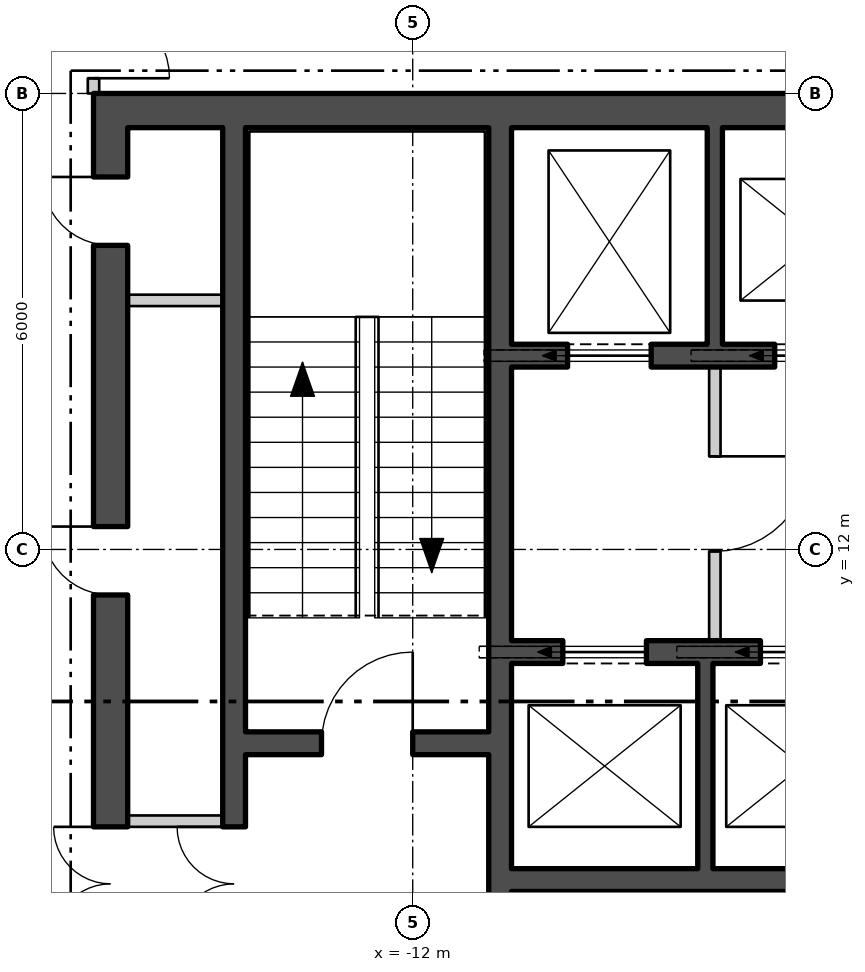
"""IFC4 building model, lengths in metres.
Left out: names, types, materials, properties, quantities, classifications, styles, units other than length and angle.
Written with IfcOpenShell. Run it as: python <this file> out.ifc"""

import sys

from ifc_helpers import new_model, si_unit, direction, frame, frame_2d, origin, place, context, subcontext, project, spatial, polyline, rectangle, outline, extrude, element, fill, save


model = new_model("IFC4")
c1 = context("Model", 3, precision=1e-05, world=origin(), true_north=direction((0.0, 1.0)))
c2 = subcontext(c1, "Body", "Model", "MODEL_VIEW")
j1 = project(units=[si_unit("LENGTHUNIT", "METRE"), si_unit("PLANEANGLEUNIT", "RADIAN")], contexts=[c1])
p1 = place(None, origin())
s1 = spatial("IfcSite", under=j1, at=p1, CompositionType="ELEMENT")
p2 = place(p1, origin())
s2 = spatial("IfcBuilding", under=s1, at=p2, CompositionType="ELEMENT")
p3 = place(p2, frame((0.0, 0.0, 227.7)))
s3 = spatial("IfcBuildingStorey", under=s2, at=p3, CompositionType="ELEMENT", Elevation=227.7)
p4 = place(p3, frame((-26.075, 14.415, -0.18), z_axis=(0.0, 0.0, 1.0), x_axis=(0.499999194392, -0.866025868902, 0.0)))
e1 = element("IfcWall", 1, at=p4, inside=s3, PredefinedType="SOLIDWALL", context=c2, shape_type="SweptSolid", body=[
    extrude(outline(polyline([(-0.13, -0.225), (45.86, -0.225), (45.6, 0.225), (0.13, 0.225), (-0.13, -0.225)])), origin(), (0.0, 0.0, 1.0), 3.68),
])
p5 = place(p4, frame((1.424, 0.0, 1.08)))
e2 = element("IfcOpeningElement", 2, at=p5, cuts=e1, PredefinedType="OPENING", context=c2, shape_type="SweptSolid", body=[
    extrude(rectangle(XDim=2.4, YDim=2.0, at=frame_2d((1.2, 1.0))), frame((0.0, 0.235, 0.0), z_axis=(0.0, -1.0, 0.0), x_axis=(1.0, 0.0, 0.0)), (0.0, 0.0, 1.0), 0.47),
])
p6 = place(p4, frame((5.892, 0.0, 1.08)))
e3 = element("IfcOpeningElement", 3, at=p6, cuts=e1, PredefinedType="OPENING", context=c2, shape_type="SweptSolid", body=[
    extrude(rectangle(XDim=2.4, YDim=2.0, at=frame_2d((1.2, 1.0))), frame((0.0, 0.235, 0.0), z_axis=(0.0, -1.0, 0.0), x_axis=(1.0, 0.0, 0.0)), (0.0, 0.0, 1.0), 0.47),
])
p7 = place(p4, frame((10.399, 0.0, 1.08)))
e4 = element("IfcOpeningElement", 4, at=p7, cuts=e1, PredefinedType="OPENING", context=c2, shape_type="SweptSolid", body=[
    extrude(rectangle(XDim=2.4, YDim=2.0, at=frame_2d((1.2, 1.0))), frame((0.0, 0.235, 0.0), z_axis=(0.0, -1.0, 0.0), x_axis=(1.0, 0.0, 0.0)), (0.0, 0.0, 1.0), 0.47),
])
p8 = place(p4, frame((19.412, 0.0, 1.08)))
e5 = element("IfcOpeningElement", 5, at=p8, cuts=e1, PredefinedType="OPENING", context=c2, shape_type="SweptSolid", body=[
    extrude(rectangle(XDim=2.4, YDim=2.0, at=frame_2d((1.2, 1.0))), frame((0.0, 0.235, 0.0), z_axis=(0.0, -1.0, 0.0), x_axis=(1.0, 0.0, 0.0)), (0.0, 0.0, 1.0), 0.47),
])
p9 = place(p4, frame((23.918, 0.0, 1.08)))
e6 = element("IfcOpeningElement", 6, at=p9, cuts=e1, PredefinedType="OPENING", context=c2, shape_type="SweptSolid", body=[
    extrude(rectangle(XDim=2.4, YDim=2.0, at=frame_2d((1.2, 1.0))), frame((0.0, 0.235, 0.0), z_axis=(0.0, -1.0, 0.0), x_axis=(1.0, 0.0, 0.0)), (0.0, 0.0, 1.0), 0.47),
])
p10 = place(p4, frame((28.425, 0.0, 1.08)))
e7 = element("IfcOpeningElement", 7, at=p10, cuts=e1, PredefinedType="OPENING", context=c2, shape_type="SweptSolid", body=[
    extrude(rectangle(XDim=2.4, YDim=2.0, at=frame_2d((1.2, 1.0))), frame((0.0, 0.235, 0.0), z_axis=(0.0, -1.0, 0.0), x_axis=(1.0, 0.0, 0.0)), (0.0, 0.0, 1.0), 0.47),
])
p11 = place(p4, frame((32.932, 0.0, 1.08)))
e8 = element("IfcOpeningElement", 8, at=p11, cuts=e1, PredefinedType="OPENING", context=c2, shape_type="SweptSolid", body=[
    extrude(rectangle(XDim=2.4, YDim=2.0, at=frame_2d((1.2, 1.0))), frame((0.0, 0.235, 0.0), z_axis=(0.0, -1.0, 0.0), x_axis=(1.0, 0.0, 0.0)), (0.0, 0.0, 1.0), 0.47),
])
p12 = place(p4, frame((41.907, 0.0, 1.08)))
e9 = element("IfcOpeningElement", 9, at=p12, cuts=e1, PredefinedType="OPENING", context=c2, shape_type="SweptSolid", body=[
    extrude(rectangle(XDim=2.4, YDim=2.0, at=frame_2d((1.2, 1.0))), frame((0.0, 0.235, 0.0), z_axis=(0.0, -1.0, 0.0), x_axis=(1.0, 0.0, 0.0)), (0.0, 0.0, 1.0), 0.47),
])
p13 = place(p3, frame((-16.2, 17.775, 0.0), z_axis=(0.0, 0.0, 1.0), x_axis=(1.0, 0.0, 0.0)))
e10 = element("IfcWall", 10, at=p13, inside=s3, PredefinedType="SHEAR", context=c2, shape_type="SweptSolid", body=[
    extrude(rectangle(XDim=32.4, YDim=0.45, at=frame_2d((16.2, 0.0))), origin(), (0.0, 0.0, 1.0), 3.7),
])
p14 = place(p3, frame((-15.975, 2.45, 0.0), z_axis=(0.0, 0.0, 1.0), x_axis=(0.0, 1.0, 0.0)))
e11 = element("IfcWall", 11, at=p14, inside=s3, PredefinedType="SHEAR", context=c2, shape_type="SweptSolid", body=[
    extrude(rectangle(XDim=15.1, YDim=0.45, at=frame_2d((7.55, 0.0))), origin(), (0.0, 0.0, 1.0), 3.7),
])
p15 = place(p14, frame((4.4, 0.0, 0.0)))
e12 = element("IfcOpeningElement", 12, at=p15, cuts=e11, PredefinedType="OPENING", context=c2, shape_type="SweptSolid", body=[
    extrude(rectangle(XDim=1.5, YDim=2.1, at=frame_2d((0.75, 1.05))), frame((0.0, 0.235, 0.0), z_axis=(0.0, -1.0, 0.0), x_axis=(1.0, 0.0, 0.0)), (0.0, 0.0, 1.0), 0.47),
])
p16 = place(p14, frame((0.85, 0.0, 0.0)))
e13 = element("IfcOpeningElement", 13, at=p16, cuts=e11, PredefinedType="OPENING", context=c2, shape_type="SweptSolid", body=[
    extrude(rectangle(XDim=0.9, YDim=2.1, at=frame_2d((0.45, 1.05))), frame((0.0, 0.235, 0.0), z_axis=(0.0, -1.0, 0.0), x_axis=(1.0, 0.0, 0.0)), (0.0, 0.0, 1.0), 0.47),
])
p17 = place(p14, frame((3.0, 0.0, 0.0)))
e14 = element("IfcOpeningElement", 14, at=p17, cuts=e11, PredefinedType="OPENING", context=c2, shape_type="SweptSolid", body=[
    extrude(rectangle(XDim=1.0, YDim=2.1, at=frame_2d((0.5, 1.05))), frame((0.0, 0.235, 0.0), z_axis=(0.0, -1.0, 0.0), x_axis=(1.0, 0.0, 0.0)), (0.0, 0.0, 1.0), 0.47),
])
p18 = place(p14, frame((8.951, 0.0, 0.0)))
e15 = element("IfcOpeningElement", 15, at=p18, cuts=e11, PredefinedType="OPENING", context=c2, shape_type="SweptSolid", body=[
    extrude(rectangle(XDim=0.9, YDim=2.1, at=frame_2d((0.45, 1.05))), frame((0.0, 0.235, 0.0), z_axis=(0.0, -1.0, 0.0), x_axis=(1.0, 0.0, 0.0)), (0.0, 0.0, 1.0), 0.47),
])
p19 = place(p14, frame((13.551, 0.0, 0.0)))
e16 = element("IfcOpeningElement", 16, at=p19, cuts=e11, PredefinedType="OPENING", context=c2, shape_type="SweptSolid", body=[
    extrude(rectangle(XDim=0.9, YDim=2.1, at=frame_2d((0.45, 1.05))), frame((0.0, 0.235, 0.0), z_axis=(0.0, -1.0, 0.0), x_axis=(1.0, 0.0, 0.0)), (0.0, 0.0, 1.0), 0.47),
])
p20 = place(p3, frame((-10.85, 2.45, 0.0), z_axis=(0.0, 0.0, 1.0), x_axis=(0.0, 1.0, 0.0)))
e17 = element("IfcWall", 17, at=p20, inside=s3, PredefinedType="SHEAR", context=c2, shape_type="SweptSolid", body=[
    extrude(rectangle(XDim=15.1, YDim=0.3, at=frame_2d((7.55, 0.0))), origin(), (0.0, 0.0, 1.0), 3.7),
])
p21 = place(p20, frame((3.525, 0.0, 0.0)))
e18 = element("IfcOpeningElement", 18, at=p21, cuts=e17, PredefinedType="OPENING", context=c2, shape_type="SweptSolid", body=[
    extrude(rectangle(XDim=1.25, YDim=2.1, at=frame_2d((0.625, 1.05))), frame((0.0, 0.16, 0.0), z_axis=(0.0, -1.0, 0.0), x_axis=(1.0, 0.0, 0.0)), (0.0, 0.0, 1.0), 0.32),
])
p22 = place(p20, frame((1.15, 0.0, 0.0)))
e19 = element("IfcOpeningElement", 19, at=p22, cuts=e17, PredefinedType="OPENING", context=c2, shape_type="SweptSolid", body=[
    extrude(rectangle(XDim=1.0, YDim=2.1, at=frame_2d((0.5, 1.05))), frame((0.0, 0.16, 0.0), z_axis=(0.0, -1.0, 0.0), x_axis=(1.0, 0.0, 0.0)), (0.0, 0.0, 1.0), 0.32),
])
p23 = place(p3, frame((-14.35, 2.45, 0.0), z_axis=(0.0, 0.0, 1.0), x_axis=(0.0, 1.0, 0.0)))
e20 = element("IfcWall", 20, at=p23, inside=s3, PredefinedType="SHEAR", context=c2, shape_type="SweptSolid", body=[
    extrude(rectangle(XDim=15.1, YDim=0.3, at=frame_2d((7.55, 0.0))), origin(), (0.0, 0.0, 1.0), 3.7),
])
p24 = place(p23, frame((4.4, 0.0, 0.0)))
e21 = element("IfcOpeningElement", 21, at=p24, cuts=e20, PredefinedType="OPENING", context=c2, shape_type="SweptSolid", body=[
    extrude(rectangle(XDim=1.5, YDim=2.1, at=frame_2d((0.75, 1.05))), frame((0.0, 0.16, 0.0), z_axis=(0.0, -1.0, 0.0), x_axis=(1.0, 0.0, 0.0)), (0.0, 0.0, 1.0), 0.32),
])
p25 = place(p3, frame((-14.2, 9.45, 0.0), z_axis=(0.0, 0.0, 1.0), x_axis=(1.0, 0.0, 0.0)))
e22 = element("IfcWall", 22, at=p25, inside=s3, PredefinedType="SHEAR", context=c2, shape_type="SweptSolid", body=[
    extrude(rectangle(XDim=3.2, YDim=0.3, at=frame_2d((1.6, 0.0))), origin(), (0.0, 0.0, 1.0), 3.7),
])
p26 = place(p25, frame((1.0, 0.0, 0.0)))
e23 = element("IfcOpeningElement", 23, at=p26, cuts=e22, PredefinedType="OPENING", context=c2, shape_type="SweptSolid", body=[
    extrude(rectangle(XDim=1.2, YDim=2.1, at=frame_2d((0.6, 1.05))), frame((0.0, 0.16, 0.0), z_axis=(0.0, -1.0, 0.0), x_axis=(1.0, 0.0, 0.0)), (0.0, 0.0, 1.0), 0.32),
])
p27 = place(p3, frame((-10.7, 14.55, 0.0), z_axis=(0.0, 0.0, 1.0), x_axis=(1.0, 0.0, 0.0)))
e24 = element("IfcWall", 24, at=p27, inside=s3, PredefinedType="SHEAR", context=c2, shape_type="SweptSolid", body=[
    extrude(rectangle(XDim=21.4, YDim=0.3, at=frame_2d((10.7, 0.0))), origin(), (0.0, 0.0, 1.0), 3.7),
])
p28 = place(p27, frame((0.738, 0.0, 0.0)))
e25 = element("IfcOpeningElement", 25, at=p28, cuts=e24, PredefinedType="OPENING", context=c2, shape_type="SweptSolid", body=[
    extrude(rectangle(XDim=1.1, YDim=2.1, at=frame_2d((0.55, 1.05))), frame((0.0, 0.16, 0.0), z_axis=(0.0, -1.0, 0.0), x_axis=(1.0, 0.0, 0.0)), (0.0, 0.0, 1.0), 0.32),
])
p29 = place(p27, frame((3.462, 0.0, 0.0)))
e26 = element("IfcOpeningElement", 26, at=p29, cuts=e24, PredefinedType="OPENING", context=c2, shape_type="SweptSolid", body=[
    extrude(rectangle(XDim=1.1, YDim=2.1, at=frame_2d((0.55, 1.05))), frame((0.0, 0.16, 0.0), z_axis=(0.0, -1.0, 0.0), x_axis=(1.0, 0.0, 0.0)), (0.0, 0.0, 1.0), 0.32),
])
p30 = place(p27, frame((6.138, 0.0, 0.0)))
e27 = element("IfcOpeningElement", 27, at=p30, cuts=e24, PredefinedType="OPENING", context=c2, shape_type="SweptSolid", body=[
    extrude(rectangle(XDim=1.1, YDim=2.1, at=frame_2d((0.55, 1.05))), frame((0.0, 0.16, 0.0), z_axis=(0.0, -1.0, 0.0), x_axis=(1.0, 0.0, 0.0)), (0.0, 0.0, 1.0), 0.32),
])
p31 = place(p27, frame((8.812, 0.0, 0.0)))
e28 = element("IfcOpeningElement", 28, at=p31, cuts=e24, PredefinedType="OPENING", context=c2, shape_type="SweptSolid", body=[
    extrude(rectangle(XDim=1.1, YDim=2.1, at=frame_2d((0.55, 1.05))), frame((0.0, 0.16, 0.0), z_axis=(0.0, -1.0, 0.0), x_axis=(1.0, 0.0, 0.0)), (0.0, 0.0, 1.0), 0.32),
])
p32 = place(p27, frame((19.562, 0.0, 0.0)))
e29 = element("IfcOpeningElement", 29, at=p32, cuts=e24, PredefinedType="OPENING", context=c2, shape_type="SweptSolid", body=[
    extrude(rectangle(XDim=1.1, YDim=2.1, at=frame_2d((0.55, 1.05))), frame((0.0, 0.16, 0.0), z_axis=(0.0, -1.0, 0.0), x_axis=(1.0, 0.0, 0.0)), (0.0, 0.0, 1.0), 0.32),
])
p33 = place(p27, frame((11.537, 0.0, 0.0)))
e30 = element("IfcOpeningElement", 30, at=p33, cuts=e24, PredefinedType="OPENING", context=c2, shape_type="SweptSolid", body=[
    extrude(rectangle(XDim=1.0, YDim=2.1, at=frame_2d((0.5, 1.05))), frame((0.0, 0.16, 0.0), z_axis=(0.0, -1.0, 0.0), x_axis=(1.0, 0.0, 0.0)), (0.0, 0.0, 1.0), 0.32),
])
p34 = place(p27, frame((14.213, 0.0, 0.0)))
e31 = element("IfcOpeningElement", 31, at=p34, cuts=e24, PredefinedType="OPENING", context=c2, shape_type="SweptSolid", body=[
    extrude(rectangle(XDim=1.0, YDim=2.1, at=frame_2d((0.5, 1.05))), frame((0.0, 0.16, 0.0), z_axis=(0.0, -1.0, 0.0), x_axis=(1.0, 0.0, 0.0)), (0.0, 0.0, 1.0), 0.32),
])
p35 = place(p27, frame((16.887, 0.0, 0.0)))
e32 = element("IfcOpeningElement", 32, at=p35, cuts=e24, PredefinedType="OPENING", context=c2, shape_type="SweptSolid", body=[
    extrude(rectangle(XDim=1.0, YDim=2.1, at=frame_2d((0.5, 1.05))), frame((0.0, 0.16, 0.0), z_axis=(0.0, -1.0, 0.0), x_axis=(1.0, 0.0, 0.0)), (0.0, 0.0, 1.0), 0.32),
])
p36 = place(p3, frame((-10.7, 10.65, 0.0), z_axis=(0.0, 0.0, 1.0), x_axis=(1.0, 0.0, 0.0)))
e33 = element("IfcWall", 33, at=p36, inside=s3, PredefinedType="SHEAR", context=c2, shape_type="SweptSolid", body=[
    extrude(rectangle(XDim=10.3, YDim=0.3, at=frame_2d((5.15, 0.0))), origin(), (0.0, 0.0, 1.0), 3.7),
])
p37 = place(p36, frame((0.675, 0.0, 0.0)))
e34 = element("IfcOpeningElement", 34, at=p37, cuts=e33, PredefinedType="OPENING", context=c2, shape_type="SweptSolid", body=[
    extrude(rectangle(XDim=1.1, YDim=2.1, at=frame_2d((0.55, 1.05))), frame((0.0, 0.16, 0.0), z_axis=(0.0, -1.0, 0.0), x_axis=(1.0, 0.0, 0.0)), (0.0, 0.0, 1.0), 0.32),
])
p38 = place(p36, frame((3.275, 0.0, 0.0)))
e35 = element("IfcOpeningElement", 35, at=p38, cuts=e33, PredefinedType="OPENING", context=c2, shape_type="SweptSolid", body=[
    extrude(rectangle(XDim=1.1, YDim=2.1, at=frame_2d((0.55, 1.05))), frame((0.0, 0.16, 0.0), z_axis=(0.0, -1.0, 0.0), x_axis=(1.0, 0.0, 0.0)), (0.0, 0.0, 1.0), 0.32),
])
p39 = place(p36, frame((5.825, 0.0, 0.0)))
e36 = element("IfcOpeningElement", 36, at=p39, cuts=e33, PredefinedType="OPENING", context=c2, shape_type="SweptSolid", body=[
    extrude(rectangle(XDim=1.1, YDim=2.1, at=frame_2d((0.55, 1.05))), frame((0.0, 0.16, 0.0), z_axis=(0.0, -1.0, 0.0), x_axis=(1.0, 0.0, 0.0)), (0.0, 0.0, 1.0), 0.32),
])
p40 = place(p36, frame((8.425, 0.0, 0.0)))
e37 = element("IfcOpeningElement", 37, at=p40, cuts=e33, PredefinedType="OPENING", context=c2, shape_type="SweptSolid", body=[
    extrude(rectangle(XDim=1.0, YDim=2.1, at=frame_2d((0.5, 1.05))), frame((0.0, 0.16, 0.0), z_axis=(0.0, -1.0, 0.0), x_axis=(1.0, 0.0, 0.0)), (0.0, 0.0, 1.0), 0.32),
])
p41 = place(p3, frame((-10.7, 7.65, 0.0), z_axis=(0.0, 0.0, 1.0), x_axis=(1.0, 0.0, 0.0)))
e38 = element("IfcWall", 38, at=p41, inside=s3, PredefinedType="SHEAR", context=c2, shape_type="SweptSolid", body=[
    extrude(rectangle(XDim=10.3, YDim=0.3, at=frame_2d((5.15, 0.0))), origin(), (0.0, 0.0, 1.0), 3.7),
])
p42 = place(p3, frame((-8.025, 14.7, 0.0), z_axis=(0.0, 0.0, 1.0), x_axis=(0.0, 1.0, 0.0)))
e39 = element("IfcWall", 39, at=p42, inside=s3, PredefinedType="SHEAR", context=c2, shape_type="SweptSolid", body=[
    extrude(rectangle(XDim=2.85, YDim=0.2, at=frame_2d((1.425, 0.0))), origin(), (0.0, 0.0, 1.0), 3.7),
])
p43 = place(p3, frame((-8.15, 7.8, 0.0), z_axis=(0.0, 0.0, 1.0), x_axis=(0.0, 1.0, 0.0)))
e40 = element("IfcWall", 40, at=p43, inside=s3, PredefinedType="SHEAR", context=c2, shape_type="SweptSolid", body=[
    extrude(rectangle(XDim=2.7, YDim=0.2, at=frame_2d((1.35, 0.0))), origin(), (0.0, 0.0, 1.0), 3.7),
])
p44 = place(p3, frame((-8.025, 10.8, 0.0), z_axis=(0.0, 0.0, 1.0), x_axis=(0.0, 1.0, 0.0)))
e41 = element("IfcWall", 41, at=p44, inside=s3, PredefinedType="PARTITIONING", context=c2, shape_type="SweptSolid", body=[
    extrude(rectangle(XDim=3.6, YDim=0.15, at=frame_2d((1.8, 0.0))), origin(), (0.0, 0.0, 1.0), 3.7),
])
p45 = place(p44, frame((1.175, 0.0, 0.0)))
e42 = element("IfcOpeningElement", 42, at=p45, cuts=e41, PredefinedType="OPENING", context=c2, shape_type="SweptSolid", body=[
    extrude(rectangle(XDim=1.25, YDim=2.1, at=frame_2d((0.625, 1.05))), frame((0.0, 0.085, 0.0), z_axis=(0.0, -1.0, 0.0), x_axis=(1.0, 0.0, 0.0)), (0.0, 0.0, 1.0), 0.17),
])
for number, where, z_axis, x_axis in (
    (43, (-15.75, 8.425, 0.0), (0.0, 0.0, 1.0), (1.0, 0.0, 0.0)),
    (44, (-15.75, 15.277, 0.0), (0.0, 0.0, 1.0), (1.0, 0.0, 0.0)),
):
    element("IfcWall", number, at=place(p3, frame(where, z_axis=z_axis, x_axis=x_axis)), inside=s3, PredefinedType="PARTITIONING", context=c2, shape_type="SweptSolid", body=[
        extrude(rectangle(XDim=1.25, YDim=0.15, at=frame_2d((0.625, 0.0))), origin(), (0.0, 0.0, 1.0), 3.7),
    ])
p46 = place(p3, frame((-16.2, 18.0, 0.0), z_axis=(0.0, 0.0, 1.0), x_axis=(0.0, 1.0, 0.0)))
e45 = element("IfcWall", 45, at=p46, inside=s3, PredefinedType="PARTITIONING", context=c2, shape_type="SweptSolid", body=[
    extrude(rectangle(XDim=1.75, YDim=0.15, at=frame_2d((0.875, 0.0))), origin(), (0.0, 0.0, 1.0), 3.7),
])
p47 = place(p46, frame((0.2, 0.0, 0.0)))
e46 = element("IfcOpeningElement", 46, at=p47, cuts=e45, PredefinedType="OPENING", context=c2, shape_type="SweptSolid", body=[
    extrude(rectangle(XDim=1.0, YDim=2.1, at=frame_2d((0.5, 1.05))), frame((0.0, 0.085, 0.0), z_axis=(0.0, -1.0, 0.0), x_axis=(1.0, 0.0, 0.0)), (0.0, 0.0, 1.0), 0.17),
])
p48 = place(p28, origin())
e47 = element("IfcDoor", 47, at=p48, inside=s3, OperationType="SLIDING_TO_LEFT", PredefinedType="DOOR", context=c2, shape_type="SweptSolid", body=[
    extrude(rectangle(XDim=1.1, YDim=2.1, at=frame_2d((0.55, 1.05))), frame((0.0, 0.025, 0.0), z_axis=(0.0, -1.0, 0.0), x_axis=(1.0, 0.0, 0.0)), (0.0, 0.0, 1.0), 0.05),
])
fill(e25, e47)
p49 = place(p29, origin())
e48 = element("IfcDoor", 48, at=p49, inside=s3, OperationType="SLIDING_TO_LEFT", PredefinedType="DOOR", context=c2, shape_type="SweptSolid", body=[
    extrude(rectangle(XDim=1.1, YDim=2.1, at=frame_2d((0.55, 1.05))), frame((0.0, 0.025, 0.0), z_axis=(0.0, -1.0, 0.0), x_axis=(1.0, 0.0, 0.0)), (0.0, 0.0, 1.0), 0.05),
])
fill(e26, e48)
p50 = place(p37, origin())
e49 = element("IfcDoor", 49, at=p50, inside=s3, OperationType="SLIDING_TO_LEFT", PredefinedType="DOOR", context=c2, shape_type="SweptSolid", body=[
    extrude(rectangle(XDim=1.1, YDim=2.1, at=frame_2d((0.55, 1.05))), frame((0.0, 0.025, 0.0), z_axis=(0.0, -1.0, 0.0), x_axis=(1.0, 0.0, 0.0)), (0.0, 0.0, 1.0), 0.05),
])
fill(e34, e49)
p51 = place(p38, origin())
e50 = element("IfcDoor", 50, at=p51, inside=s3, OperationType="SLIDING_TO_LEFT", PredefinedType="DOOR", context=c2, shape_type="SweptSolid", body=[
    extrude(rectangle(XDim=1.1, YDim=2.1, at=frame_2d((0.55, 1.05))), frame((0.0, 0.025, 0.0), z_axis=(0.0, -1.0, 0.0), x_axis=(1.0, 0.0, 0.0)), (0.0, 0.0, 1.0), 0.05),
])
fill(e35, e50)
p52 = place(p45, origin())
e51 = element("IfcDoor", 51, at=p52, inside=s3, OperationType="SINGLE_SWING_RIGHT", PredefinedType="DOOR", context=c2, shape_type="SweptSolid", body=[
    extrude(rectangle(XDim=1.25, YDim=2.1, at=frame_2d((0.625, 1.05))), frame((0.0, 0.025, 0.0), z_axis=(0.0, -1.0, 0.0), x_axis=(1.0, 0.0, 0.0)), (0.0, 0.0, 1.0), 0.05),
])
fill(e42, e51)
p53 = place(p26, origin())
e52 = element("IfcDoor", 52, at=p53, inside=s3, OperationType="SINGLE_SWING_LEFT", PredefinedType="DOOR", context=c2, shape_type="SweptSolid", body=[
    extrude(rectangle(XDim=1.2, YDim=2.1, at=frame_2d((0.6, 1.05))), frame((0.0, 0.025, 0.0), z_axis=(0.0, -1.0, 0.0), x_axis=(1.0, 0.0, 0.0)), (0.0, 0.0, 1.0), 0.05),
])
fill(e23, e52)
p54 = place(p24, origin())
e53 = element("IfcDoor", 53, at=p54, inside=s3, OperationType="DOUBLE_DOOR_SINGLE_SWING", PredefinedType="DOOR", context=c2, shape_type="SweptSolid", body=[
    extrude(rectangle(XDim=1.5, YDim=2.1, at=frame_2d((0.75, 1.05))), frame((0.0, 0.025, 0.0), z_axis=(0.0, -1.0, 0.0), x_axis=(1.0, 0.0, 0.0)), (0.0, 0.0, 1.0), 0.05),
])
fill(e21, e53)
p55 = place(p15, origin())
e54 = element("IfcDoor", 54, at=p55, inside=s3, OperationType="DOUBLE_DOOR_SINGLE_SWING", PredefinedType="DOOR", context=c2, shape_type="SweptSolid", body=[
    extrude(rectangle(XDim=1.5, YDim=2.1, at=frame_2d((0.75, 1.05))), frame((0.0, 0.025, 0.0), z_axis=(0.0, -1.0, 0.0), x_axis=(1.0, 0.0, 0.0)), (0.0, 0.0, 1.0), 0.05),
])
fill(e12, e54)
p56 = place(p18, origin())
e55 = element("IfcDoor", 55, at=p56, inside=s3, OperationType="SINGLE_SWING_LEFT", PredefinedType="DOOR", context=c2, shape_type="SweptSolid", body=[
    extrude(rectangle(XDim=0.9, YDim=2.1, at=frame_2d((0.45, 1.05))), frame((0.0, 0.025, 0.0), z_axis=(0.0, -1.0, 0.0), x_axis=(1.0, 0.0, 0.0)), (0.0, 0.0, 1.0), 0.05),
])
fill(e15, e55)
p57 = place(p19, origin())
e56 = element("IfcDoor", 56, at=p57, inside=s3, OperationType="SINGLE_SWING_LEFT", PredefinedType="DOOR", context=c2, shape_type="SweptSolid", body=[
    extrude(rectangle(XDim=0.9, YDim=2.1, at=frame_2d((0.45, 1.05))), frame((0.0, 0.025, 0.0), z_axis=(0.0, -1.0, 0.0), x_axis=(1.0, 0.0, 0.0)), (0.0, 0.0, 1.0), 0.05),
])
fill(e16, e56)
p58 = place(p47, origin())
e57 = element("IfcDoor", 57, at=p58, inside=s3, OperationType="SINGLE_SWING_LEFT", PredefinedType="DOOR", context=c2, shape_type="SweptSolid", body=[
    extrude(rectangle(XDim=1.0, YDim=2.1, at=frame_2d((0.5, 1.05))), frame((0.0, 0.025, 0.0), z_axis=(0.0, -1.0, 0.0), x_axis=(1.0, 0.0, 0.0)), (0.0, 0.0, 1.0), 0.05),
])
fill(e46, e57)
save(model, sys.argv[1])
